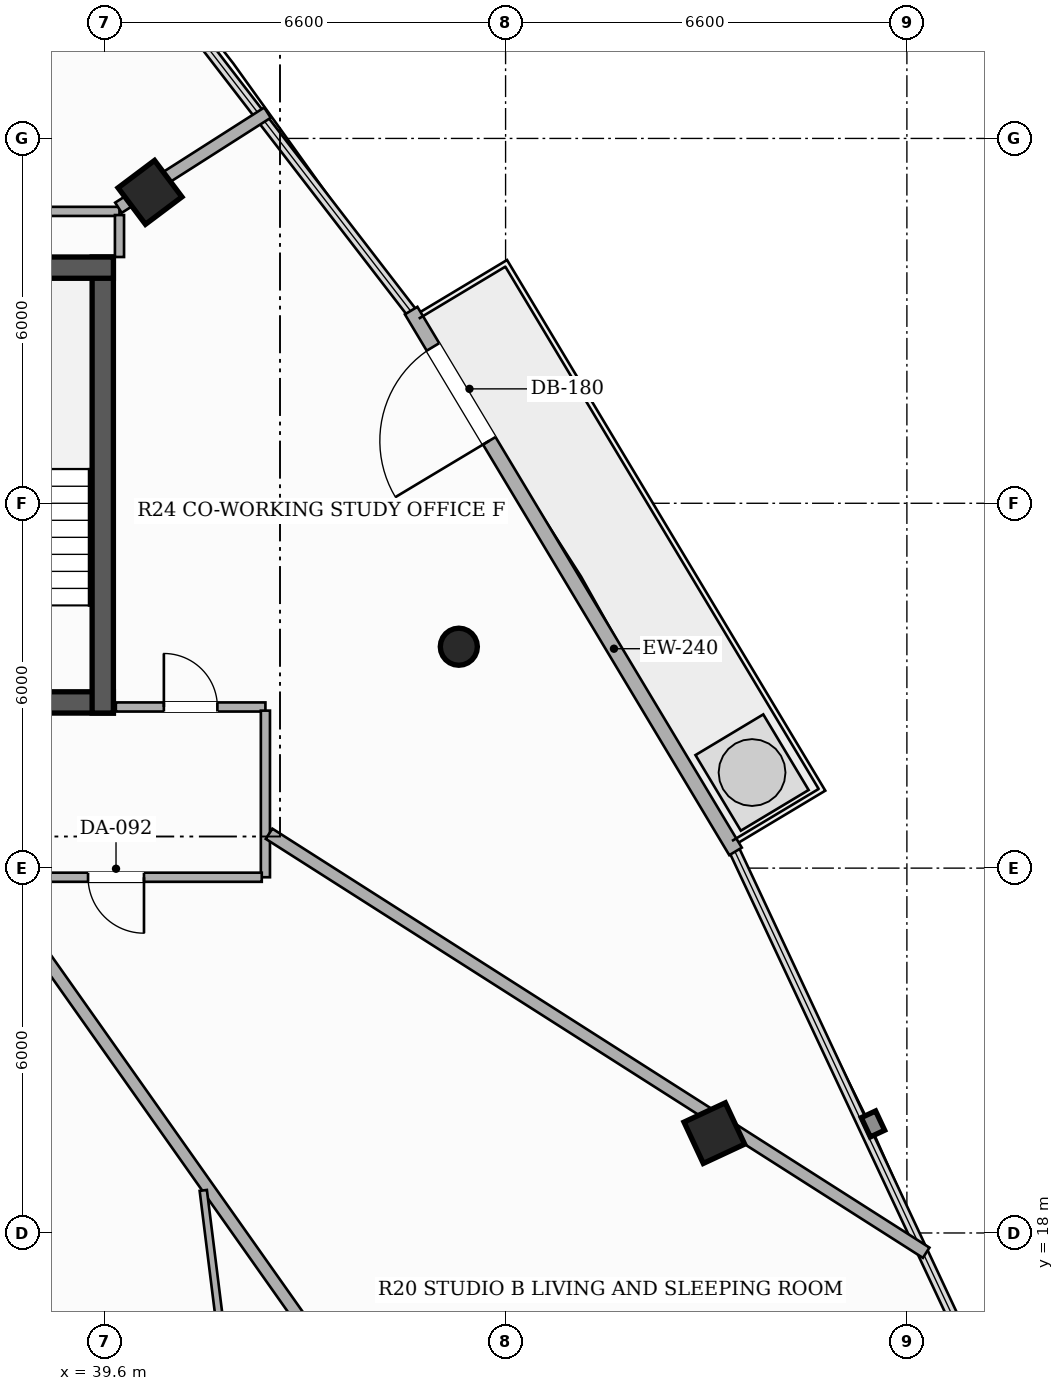
"""IFC4 building model, lengths in metres.
Left out: names, types, materials, properties, quantities, classifications, styles, units other than length and angle.
Written with IfcOpenShell. Run it as: python <this file> out.ifc"""

import sys

from ifc_helpers import new_model, si_unit, direction, frame, frame_2d, origin, origin_2d, place, context, subcontext, project, spatial, rectangle, hollow_rectangle, hollow_circle, extrude, element, fill, save


model = new_model("IFC4")
c1 = context("Model", 3, precision=1e-05, world=origin(), true_north=direction((0.0, 1.0)))
c2 = subcontext(c1, "Body", "Model", "MODEL_VIEW")
j1 = project(units=[si_unit("LENGTHUNIT", "METRE"), si_unit("PLANEANGLEUNIT", "RADIAN")], contexts=[c1])
p1 = place(None, origin())
s1 = spatial("IfcSite", under=j1, at=p1, CompositionType="ELEMENT")
p2 = place(p1, origin())
s2 = spatial("IfcBuilding", under=s1, at=p2, CompositionType="ELEMENT")
p3 = place(p2, frame((0.0, 0.0, 212.9)))
s3 = spatial("IfcBuildingStorey", under=s2, at=p3, CompositionType="ELEMENT", Elevation=212.9)
p4 = place(p3, frame((26.25, 26.725, 0.0), z_axis=(0.0, 0.0, 1.0), x_axis=(1.0, 0.0, 0.0)))
e1 = element("IfcWall", 1, at=p4, inside=s3, PredefinedType="SHEAR", context=c2, shape_type="SweptSolid", body=[
    extrude(rectangle(XDim=13.5, YDim=0.35, at=frame_2d((6.75, 0.0))), origin(), (0.0, 0.0, 1.0), 3.3),
])
p5 = place(p4, frame((4.35, 0.0, 0.0)))
e2 = element("IfcOpeningElement", 2, at=p5, cuts=e1, PredefinedType="OPENING", context=c2, shape_type="SweptSolid", body=[
    extrude(rectangle(XDim=1.05, YDim=2.15, at=frame_2d((0.525, 1.075))), frame((0.0, 0.185, 0.0), z_axis=(0.0, -1.0, 0.0), x_axis=(1.0, 0.0, 0.0)), (0.0, 0.0, 1.0), 0.37),
])
p6 = place(p4, frame((8.3, 0.0, 0.0)))
e3 = element("IfcOpeningElement", 3, at=p6, cuts=e1, PredefinedType="OPENING", context=c2, shape_type="SweptSolid", body=[
    extrude(rectangle(XDim=1.05, YDim=2.15, at=frame_2d((0.525, 1.075))), frame((0.0, 0.185, 0.0), z_axis=(0.0, -1.0, 0.0), x_axis=(1.0, 0.0, 0.0)), (0.0, 0.0, 1.0), 0.37),
])
p7 = place(p3, frame((39.575, 26.55, 0.0), z_axis=(0.0, 0.0, 1.0), x_axis=(0.0, 1.0, 0.0)))
e4 = element("IfcWall", 4, at=p7, inside=s3, PredefinedType="SHEAR", context=c2, shape_type="SweptSolid", body=[
    extrude(rectangle(XDim=7.5, YDim=0.35, at=frame_2d((3.75, 0.0))), origin(), (0.0, 0.0, 1.0), 3.3),
])
p8 = place(p3, frame((36.15, 33.875, 0.0), z_axis=(0.0, 0.0, 1.0), x_axis=(1.0, 0.0, 0.0)))
e5 = element("IfcWall", 5, at=p8, inside=s3, PredefinedType="SHEAR", context=c2, shape_type="SweptSolid", body=[
    extrude(rectangle(XDim=3.6, YDim=0.35, at=frame_2d((1.8, 0.0))), origin(), (0.0, 0.0, 1.0), 3.3),
])
p9 = place(p3, frame((49.633, 19.642, 0.0), z_axis=(0.0, 0.0, 1.0), x_axis=(-0.422618261741, 0.906307787037, 0.0)))
e6 = element("IfcColumn", 6, at=p9, inside=s3, PredefinedType="COLUMN", context=c2, shape_type="SweptSolid", body=[
    extrude(hollow_rectangle(XDim=0.75, YDim=0.75, WallThickness=0.025, at=origin_2d()), origin(), (0.0, 0.0, 1.0), 3.3),
])
p10 = place(p3, frame((45.431, 27.641, 0.0), z_axis=(0.0, 0.0, 1.0), x_axis=(1.0, 0.0, 0.0)))
e7 = element("IfcColumn", 7, at=p10, inside=s3, PredefinedType="COLUMN", context=c2, shape_type="SweptSolid", body=[
    extrude(hollow_circle(Radius=0.305, WallThickness=0.016, at=origin_2d()), origin(), (0.0, 0.0, 1.0), 3.3),
])
p11 = place(p3, frame((40.352, 35.113, 0.0), z_axis=(0.0, 0.0, 1.0), x_axis=(-0.600420225326, 0.799684658487, 0.0)))
e8 = element("IfcColumn", 8, at=p11, inside=s3, PredefinedType="COLUMN", context=c2, shape_type="SweptSolid", body=[
    extrude(hollow_rectangle(XDim=0.75, YDim=0.75, WallThickness=0.025, at=origin_2d()), origin(), (0.0, 0.0, 1.0), 3.3),
])
p12 = place(p3, frame((49.982, 24.275, 0.0), z_axis=(0.0, 0.0, 1.0), x_axis=(-0.514391899557, 0.857555230682, 0.0)))
e9 = element("IfcWall", 9, at=p12, inside=s3, PredefinedType="SOLIDWALL", context=c2, shape_type="SweptSolid", body=[
    extrude(rectangle(XDim=10.371, YDim=0.24, at=frame_2d((5.186, 0.0))), origin(), (0.0, 0.0, 1.0), 2.624),
])
p13 = place(p12, frame((7.874, 0.0, 0.0)))
e10 = element("IfcOpeningElement", 10, at=p13, cuts=e9, PredefinedType="OPENING", context=c2, shape_type="SweptSolid", body=[
    extrude(rectangle(XDim=1.8, YDim=2.2, at=frame_2d((0.9, 1.1))), frame((0.0, 0.13, 0.0), z_axis=(0.0, -1.0, 0.0), x_axis=(1.0, 0.0, 0.0)), (0.0, 0.0, 1.0), 0.26),
])
p14 = place(p3, frame((39.79, 26.65, 0.0), z_axis=(0.0, 0.0, 1.0), x_axis=(1.0, 0.0, 0.0)))
e11 = element("IfcWall", 11, at=p14, inside=s3, PredefinedType="PARTITIONING", context=c2, shape_type="SweptSolid", body=[
    extrude(rectangle(XDim=2.46, YDim=0.15, at=frame_2d((1.23, 0.0))), origin(), (0.0, 0.0, 1.0), 2.565),
])
p15 = place(p14, frame((0.79, 0.0, 0.0)))
e12 = element("IfcOpeningElement", 12, at=p15, cuts=e11, PredefinedType="OPENING", context=c2, shape_type="SweptSolid", body=[
    extrude(rectangle(XDim=0.88, YDim=2.1, at=frame_2d((0.44, 1.05))), frame((0.0, 0.085, 0.0), z_axis=(0.0, -1.0, 0.0), x_axis=(1.0, 0.0, 0.0)), (0.0, 0.0, 1.0), 0.17),
])
p16 = place(p3, frame((42.25, 26.59, 0.0), z_axis=(0.0, 0.0, 1.0), x_axis=(0.0, -1.0, 0.0)))
e13 = element("IfcWall", 13, at=p16, inside=s3, PredefinedType="PARTITIONING", context=c2, shape_type="SweptSolid", body=[
    extrude(rectangle(XDim=2.74, YDim=0.15, at=frame_2d((1.37, 0.0))), origin(), (0.0, 0.0, 1.0), 2.773),
])
p17 = place(p3, frame((42.19, 23.85, 0.0), z_axis=(0.0, 0.0, 1.0), x_axis=(-1.0, 0.0, 0.0)))
e14 = element("IfcWall", 14, at=p17, inside=s3, PredefinedType="PARTITIONING", context=c2, shape_type="SweptSolid", body=[
    extrude(rectangle(XDim=8.24, YDim=0.15, at=frame_2d((4.12, 0.0))), origin(), (0.0, 0.0, 1.0), 2.565),
])
p18 = place(p17, frame((1.937, 0.0, 0.0)))
e15 = element("IfcOpeningElement", 15, at=p18, cuts=e14, PredefinedType="OPENING", context=c2, shape_type="SweptSolid", body=[
    extrude(rectangle(XDim=0.92, YDim=2.15, at=frame_2d((0.46, 1.075))), frame((0.0, 0.085, 0.0), z_axis=(0.0, -1.0, 0.0), x_axis=(1.0, 0.0, 0.0)), (0.0, 0.0, 1.0), 0.17),
])
p19 = place(p17, frame((5.733, 0.0, 0.0)))
e16 = element("IfcOpeningElement", 16, at=p19, cuts=e14, PredefinedType="OPENING", context=c2, shape_type="SweptSolid", body=[
    extrude(rectangle(XDim=0.92, YDim=2.15, at=frame_2d((0.46, 1.075))), frame((0.0, 0.085, 0.0), z_axis=(0.0, -1.0, 0.0), x_axis=(1.0, 0.0, 0.0)), (0.0, 0.0, 1.0), 0.17),
])
p20 = place(p3, frame((36.31, 34.8, 0.0), z_axis=(0.0, 0.0, 1.0), x_axis=(1.0, 0.0, 0.0)))
e17 = element("IfcWall", 17, at=p20, inside=s3, PredefinedType="PARTITIONING", context=c2, shape_type="SweptSolid", body=[
    extrude(rectangle(XDim=3.54, YDim=0.15, at=frame_2d((1.77, 0.0))), origin(), (0.0, 0.0, 1.0), 2.425),
])
p21 = place(p3, frame((39.85, 34.74, 0.0), z_axis=(0.0, 0.0, 1.0), x_axis=(0.0, -1.0, 0.0)))
e18 = element("IfcWall", 18, at=p21, inside=s3, PredefinedType="PARTITIONING", context=c2, shape_type="SweptSolid", body=[
    extrude(rectangle(XDim=0.69, YDim=0.15, at=frame_2d((0.345, 0.0))), origin(), (0.0, 0.0, 1.0), 2.773),
])
p22 = place(p3, frame((50.316, 5.976, 0.0), z_axis=(0.0, 0.0, 1.0), x_axis=(-0.576784728977, 0.816896184603, 0.0)))
e19 = element("IfcWall", 19, at=p22, inside=s3, PredefinedType="PARTITIONING", context=c2, shape_type="SweptSolid", body=[
    extrude(rectangle(XDim=21.807, YDim=0.2, at=frame_2d((10.903, 0.0))), origin(), (0.0, 0.0, 1.0), 2.492),
])
p23 = place(p3, frame((42.31, 24.565, 0.0), z_axis=(0.0, 0.0, 1.0), x_axis=(0.843209388644, -0.537585274075, 0.0)))
e20 = element("IfcWall", 20, at=p23, inside=s3, PredefinedType="PARTITIONING", context=c2, shape_type="SweptSolid", body=[
    extrude(rectangle(XDim=12.816, YDim=0.2, at=frame_2d((6.408, 0.0))), origin(), (0.0, 0.0, 1.0), 2.492),
])
p24 = place(p3, frame((39.833, 34.86, 0.0), z_axis=(0.0, 0.0, 1.0), x_axis=(0.842993506682, 0.537923737803, 0.0)))
e21 = element("IfcWall", 21, at=p24, inside=s3, PredefinedType="PARTITIONING", context=c2, shape_type="SweptSolid", body=[
    extrude(rectangle(XDim=2.907, YDim=0.2, at=frame_2d((1.454, 0.0))), origin(), (0.0, 0.0, 1.0), 2.492),
])
p25 = place(p3, frame((41.228, 18.7, 0.0), z_axis=(0.0, 0.0, 1.0), x_axis=(0.123731094195, -0.992315784581, 0.0)))
e22 = element("IfcWall", 22, at=p25, inside=s3, PredefinedType="PARTITIONING", context=c2, shape_type="SweptSolid", body=[
    extrude(rectangle(XDim=6.432, YDim=0.12, at=frame_2d((3.216, 0.0))), origin(), (0.0, 0.0, 1.0), 3.06),
])
p26 = place(p25, frame((2.806, 0.0, 0.0)))
e23 = element("IfcOpeningElement", 23, at=p26, cuts=e22, PredefinedType="OPENING", context=c2, shape_type="SweptSolid", body=[
    extrude(rectangle(XDim=0.82, YDim=2.1, at=frame_2d((0.41, 1.05))), frame((0.0, 0.07, 0.0), z_axis=(0.0, -1.0, 0.0), x_axis=(1.0, 0.0, 0.0)), (0.0, 0.0, 1.0), 0.14),
])
p27 = place(p13, origin())
e24 = element("IfcDoor", 24, at=p27, inside=s3, OperationType="SINGLE_SWING_LEFT", PredefinedType="DOOR", context=c2, shape_type="SweptSolid", body=[
    extrude(rectangle(XDim=1.8, YDim=2.2, at=frame_2d((0.9, 1.1))), frame((0.0, 0.025, 0.0), z_axis=(0.0, -1.0, 0.0), x_axis=(1.0, 0.0, 0.0)), (0.0, 0.0, 1.0), 0.05),
])
fill(e10, e24)
p28 = place(p18, origin())
e25 = element("IfcDoor", 25, at=p28, inside=s3, OperationType="SINGLE_SWING_LEFT", PredefinedType="DOOR", context=c2, shape_type="SweptSolid", body=[
    extrude(rectangle(XDim=0.92, YDim=2.15, at=frame_2d((0.46, 1.075))), frame((0.0, 0.025, 0.0), z_axis=(0.0, -1.0, 0.0), x_axis=(1.0, 0.0, 0.0)), (0.0, 0.0, 1.0), 0.05),
])
fill(e15, e25)
p29 = place(p15, origin())
e26 = element("IfcDoor", 26, at=p29, inside=s3, OperationType="SINGLE_SWING_LEFT", PredefinedType="DOOR", context=c2, shape_type="SweptSolid", body=[
    extrude(rectangle(XDim=0.88, YDim=2.1, at=frame_2d((0.44, 1.05))), frame((0.0, 0.025, 0.0), z_axis=(0.0, -1.0, 0.0), x_axis=(1.0, 0.0, 0.0)), (0.0, 0.0, 1.0), 0.05),
])
fill(e12, e26)
save(model, sys.argv[1])
